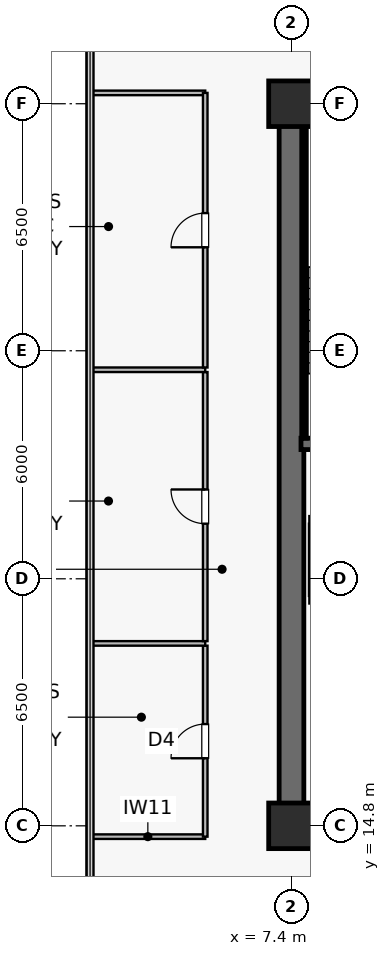
"""IFC4 building model, lengths in metres.
Left out: names, types, materials, properties, quantities, classifications, styles, units other than length and angle.
Written with IfcOpenShell. Run it as: python <this file> out.ifc"""

import sys

from ifc_helpers import new_model, si_unit, direction, frame, frame_2d, origin, origin_2d, place, context, subcontext, project, spatial, rectangle, extrude, source, transform, mapped, element, fill, save


model = new_model("IFC4")
c1 = context("Model", 3, precision=1e-05, world=origin(), true_north=direction((0.0, 1.0)))
c2 = subcontext(c1, "Body", "Model", "MODEL_VIEW")
j1 = project(units=[si_unit("LENGTHUNIT", "METRE"), si_unit("PLANEANGLEUNIT", "RADIAN")], contexts=[c1])
p1 = place(None, origin())
s1 = spatial("IfcSite", under=j1, at=p1, CompositionType="ELEMENT")
p2 = place(p1, origin())
s2 = spatial("IfcBuilding", under=s1, at=p2, CompositionType="ELEMENT")
p3 = place(p2, frame((0.0, 0.0, 133.8)))
s3 = spatial("IfcBuildingStorey", under=s2, at=p3, CompositionType="ELEMENT", Elevation=133.8)
p4 = place(p3, frame((7.075, 14.8, 0.0), z_axis=(0.0, 0.0, 1.0), x_axis=(1.0, 0.0, 0.0)))
e1 = element("IfcWall", 1, at=p4, inside=s3, PredefinedType="SHEAR", context=c2, shape_type="SweptSolid", body=[
    extrude(rectangle(XDim=15.45, YDim=0.65, at=frame_2d((7.725, 0.0))), origin(), (0.0, 0.0, 1.0), 3.79),
])
p5 = place(p3, frame((7.075, 33.8, 0.0), z_axis=(0.0, 0.0, 1.0), x_axis=(1.0, 0.0, 0.0)))
e2 = element("IfcWall", 2, at=p5, inside=s3, PredefinedType="SHEAR", context=c2, shape_type="SweptSolid", body=[
    extrude(rectangle(XDim=15.45, YDim=0.65, at=frame_2d((7.725, 0.0))), origin(), (0.0, 0.0, 1.0), 3.79),
])
p6 = place(p5, frame((5.675, 0.0, 0.0)))
e3 = element("IfcOpeningElement", 3, at=p6, cuts=e2, PredefinedType="OPENING", context=c2, shape_type="SweptSolid", body=[
    extrude(rectangle(XDim=0.95, YDim=2.15, at=frame_2d((0.475, 1.075))), frame((0.0, 0.335, 0.0), z_axis=(0.0, -1.0, 0.0), x_axis=(1.0, 0.0, 0.0)), (0.0, 0.0, 1.0), 0.67),
])
p7 = place(p5, frame((9.04, 0.0, 0.0)))
e4 = element("IfcOpeningElement", 4, at=p7, cuts=e2, PredefinedType="OPENING", context=c2, shape_type="SweptSolid", body=[
    extrude(rectangle(XDim=0.95, YDim=2.15, at=frame_2d((0.475, 1.075))), frame((0.0, 0.335, 0.0), z_axis=(0.0, -1.0, 0.0), x_axis=(1.0, 0.0, 0.0)), (0.0, 0.0, 1.0), 0.67),
])
p8 = place(p5, frame((12.44, 0.0, 0.0)))
e5 = element("IfcOpeningElement", 5, at=p8, cuts=e2, PredefinedType="OPENING", context=c2, shape_type="SweptSolid", body=[
    extrude(rectangle(XDim=0.95, YDim=2.15, at=frame_2d((0.475, 1.075))), frame((0.0, 0.335, 0.0), z_axis=(0.0, -1.0, 0.0), x_axis=(1.0, 0.0, 0.0)), (0.0, 0.0, 1.0), 0.67),
])
p9 = place(p3, frame((7.4, 15.125, 0.0), z_axis=(0.0, 0.0, 1.0), x_axis=(0.0, 1.0, 0.0)))
e6 = element("IfcWall", 6, at=p9, inside=s3, PredefinedType="SHEAR", context=c2, shape_type="SweptSolid", body=[
    extrude(rectangle(XDim=18.35, YDim=0.65, at=frame_2d((9.175, 0.0))), origin(), (0.0, 0.0, 1.0), 3.79),
])
p10 = place(p3, frame((7.65, 24.85, 0.0), z_axis=(0.0, 0.0, 1.0), x_axis=(1.0, 0.0, 0.0)))
e7 = element("IfcWall", 7, at=p10, inside=s3, PredefinedType="SHEAR", context=c2, shape_type="SweptSolid", body=[
    extrude(rectangle(XDim=3.8, YDim=0.3, at=frame_2d((1.9, 0.0))), origin(), (0.0, 0.0, 1.0), 3.79),
])
p11 = place(p3, frame((7.73, 33.4, 0.0), z_axis=(0.0, 0.0, 1.0), x_axis=(1.0, 0.0, 0.0)))
e8 = element("IfcWall", 8, at=p11, inside=s3, PredefinedType="SOLIDWALL", context=c2, shape_type="SweptSolid", body=[
    extrude(rectangle(XDim=3.72, YDim=0.12, at=frame_2d((1.86, 0.0))), origin(), (0.0, 0.0, 1.0), 3.79),
])
p12 = place(p3, frame((7.73, 25.0, 0.0), z_axis=(0.0, 0.0, 1.0), x_axis=(0.0, 1.0, 0.0)))
e9 = element("IfcWall", 9, at=p12, inside=s3, PredefinedType="SOLIDWALL", context=c2, shape_type="SweptSolid", body=[
    extrude(rectangle(XDim=8.32, YDim=0.12, at=frame_2d((4.16, 0.0))), origin(), (0.0, 0.0, 1.0), 3.79),
])
m1 = source(origin(), c2, "Body", "SweptSolid", [
    extrude(rectangle(XDim=1.2, YDim=1.2, at=origin_2d()), origin(), (0.0, 0.0, 1.0), 4.1),
])
for number, where, z_axis, x_axis in (
    (10, (7.4, 14.8, 0.0), (0.0, 0.0, 1.0), (1.0, 0.0, 0.0)),
    (11, (7.4, 33.8, 0.0), (0.0, 0.0, 1.0), (1.0, 0.0, 0.0)),
):
    element("IfcColumn", number, at=place(p3, frame(where, z_axis=z_axis, x_axis=x_axis)), inside=s3, PredefinedType="COLUMN", context=c2, shape_type="MappedRepresentation", body=[
        mapped(m1, transform((0.0, 0.0, 0.0), scale=1.0)),
    ])
for number, where, z_axis, x_axis in (
    (12, (7.87, 20.75, 0.0), (0.0, 0.0, 1.0), (1.0, 0.0, 0.0)),
    (13, (7.87, 22.85, 0.0), (0.0, 0.0, 1.0), (1.0, 0.0, 0.0)),
):
    element("IfcWall", number, at=place(p3, frame(where, z_axis=z_axis, x_axis=x_axis)), inside=s3, PredefinedType="SOLIDWALL", context=c2, shape_type="SweptSolid", body=[
        extrude(rectangle(XDim=2.26, YDim=0.2, at=frame_2d((1.13, 0.0))), origin(), (0.0, 0.0, 1.0), 3.79),
    ])
p13 = place(p3, frame((7.95, 20.85, 0.0), z_axis=(0.0, 0.0, 1.0), x_axis=(0.0, 1.0, 0.0)))
e14 = element("IfcWall", 14, at=p13, inside=s3, PredefinedType="SOLIDWALL", context=c2, shape_type="SweptSolid", body=[
    extrude(rectangle(XDim=1.9, YDim=0.18, at=frame_2d((0.95, 0.0))), origin(), (0.0, 0.0, 1.0), 3.79),
])
for number, where, z_axis, x_axis in (
    (15, (2.11, 14.515, 0.0), (0.0, 0.0, 1.0), (1.0, 0.0, 0.0)),
    (16, (2.11, 34.085, 0.0), (0.0, 0.0, 1.0), (1.0, 0.0, 0.0)),
):
    element("IfcWall", number, at=place(p3, frame(where, z_axis=z_axis, x_axis=x_axis)), inside=s3, PredefinedType="PARTITIONING", context=c2, shape_type="SweptSolid", body=[
        extrude(rectangle(XDim=3.02, YDim=0.12, at=frame_2d((1.51, 0.0))), origin(), (0.0, 0.0, 1.0), 3.79),
    ])
p14 = place(p3, frame((5.13, 14.515, 0.0), z_axis=(0.0, 0.0, 1.0), x_axis=(0.0, 1.0, 0.0)))
e17 = element("IfcWall", 17, at=p14, inside=s3, PredefinedType="PARTITIONING", context=c2, shape_type="SweptSolid", body=[
    extrude(rectangle(XDim=5.025, YDim=0.12, at=frame_2d((2.513, 0.0))), origin(), (0.0, 0.0, 1.0), 3.79),
])
p15 = place(p14, frame((2.062, 0.0, 0.0)))
e18 = element("IfcOpeningElement", 18, at=p15, cuts=e17, PredefinedType="OPENING", context=c2, shape_type="SweptSolid", body=[
    extrude(rectangle(XDim=0.9, YDim=2.1, at=frame_2d((0.45, 1.05))), frame((0.0, 0.07, 0.0), z_axis=(0.0, -1.0, 0.0), x_axis=(1.0, 0.0, 0.0)), (0.0, 0.0, 1.0), 0.14),
])
p16 = place(p3, frame((2.11, 19.6, 0.0), z_axis=(0.0, 0.0, 1.0), x_axis=(1.0, 0.0, 0.0)))
e19 = element("IfcWall", 19, at=p16, inside=s3, PredefinedType="PARTITIONING", context=c2, shape_type="SweptSolid", body=[
    extrude(rectangle(XDim=3.02, YDim=0.12, at=frame_2d((1.51, 0.0))), origin(), (0.0, 0.0, 1.0), 3.79),
])
p17 = place(p3, frame((5.13, 19.66, 0.0), z_axis=(0.0, 0.0, 1.0), x_axis=(0.0, 1.0, 0.0)))
e20 = element("IfcWall", 20, at=p17, inside=s3, PredefinedType="PARTITIONING", context=c2, shape_type="SweptSolid", body=[
    extrude(rectangle(XDim=7.08, YDim=0.12, at=frame_2d((3.54, 0.0))), origin(), (0.0, 0.0, 1.0), 3.79),
])
p18 = place(p17, frame((3.09, 0.0, 0.0)))
e21 = element("IfcOpeningElement", 21, at=p18, cuts=e20, PredefinedType="OPENING", context=c2, shape_type="SweptSolid", body=[
    extrude(rectangle(XDim=0.9, YDim=2.1, at=frame_2d((0.45, 1.05))), frame((0.0, 0.07, 0.0), z_axis=(0.0, -1.0, 0.0), x_axis=(1.0, 0.0, 0.0)), (0.0, 0.0, 1.0), 0.14),
])
p19 = place(p3, frame((2.11, 26.8, 0.0), z_axis=(0.0, 0.0, 1.0), x_axis=(1.0, 0.0, 0.0)))
e22 = element("IfcWall", 22, at=p19, inside=s3, PredefinedType="PARTITIONING", context=c2, shape_type="SweptSolid", body=[
    extrude(rectangle(XDim=3.02, YDim=0.12, at=frame_2d((1.51, 0.0))), origin(), (0.0, 0.0, 1.0), 3.79),
])
p20 = place(p3, frame((5.13, 26.86, 0.0), z_axis=(0.0, 0.0, 1.0), x_axis=(0.0, 1.0, 0.0)))
e23 = element("IfcWall", 23, at=p20, inside=s3, PredefinedType="PARTITIONING", context=c2, shape_type="SweptSolid", body=[
    extrude(rectangle(XDim=7.225, YDim=0.12, at=frame_2d((3.612, 0.0))), origin(), (0.0, 0.0, 1.0), 3.79),
])
p21 = place(p20, frame((3.163, 0.0, 0.0)))
e24 = element("IfcOpeningElement", 24, at=p21, cuts=e23, PredefinedType="OPENING", context=c2, shape_type="SweptSolid", body=[
    extrude(rectangle(XDim=0.9, YDim=2.1, at=frame_2d((0.45, 1.05))), frame((0.0, 0.07, 0.0), z_axis=(0.0, -1.0, 0.0), x_axis=(1.0, 0.0, 0.0)), (0.0, 0.0, 1.0), 0.14),
])
m2 = source(origin(), c2, "Body", "SweptSolid", [
    extrude(rectangle(XDim=0.9, YDim=2.1, at=frame_2d((0.45, 1.05))), frame((0.0, 0.025, 0.0), z_axis=(0.0, -1.0, 0.0), x_axis=(1.0, 0.0, 0.0)), (0.0, 0.0, 1.0), 0.05),
])
p22 = place(p15, origin())
e25 = element("IfcDoor", 25, at=p22, inside=s3, OperationType="SINGLE_SWING_LEFT", PredefinedType="DOOR", context=c2, shape_type="MappedRepresentation", body=[
    mapped(m2, transform((0.0, 0.0, 0.0), scale=1.0)),
])
fill(e18, e25)
p23 = place(p18, origin())
e26 = element("IfcDoor", 26, at=p23, inside=s3, OperationType="SINGLE_SWING_RIGHT", PredefinedType="DOOR", context=c2, shape_type="MappedRepresentation", body=[
    mapped(m2, transform((0.0, 0.0, 0.0), scale=1.0)),
])
fill(e21, e26)
p24 = place(p21, origin())
e27 = element("IfcDoor", 27, at=p24, inside=s3, OperationType="SINGLE_SWING_LEFT", PredefinedType="DOOR", context=c2, shape_type="MappedRepresentation", body=[
    mapped(m2, transform((0.0, 0.0, 0.0), scale=1.0)),
])
fill(e24, e27)
save(model, sys.argv[1])
